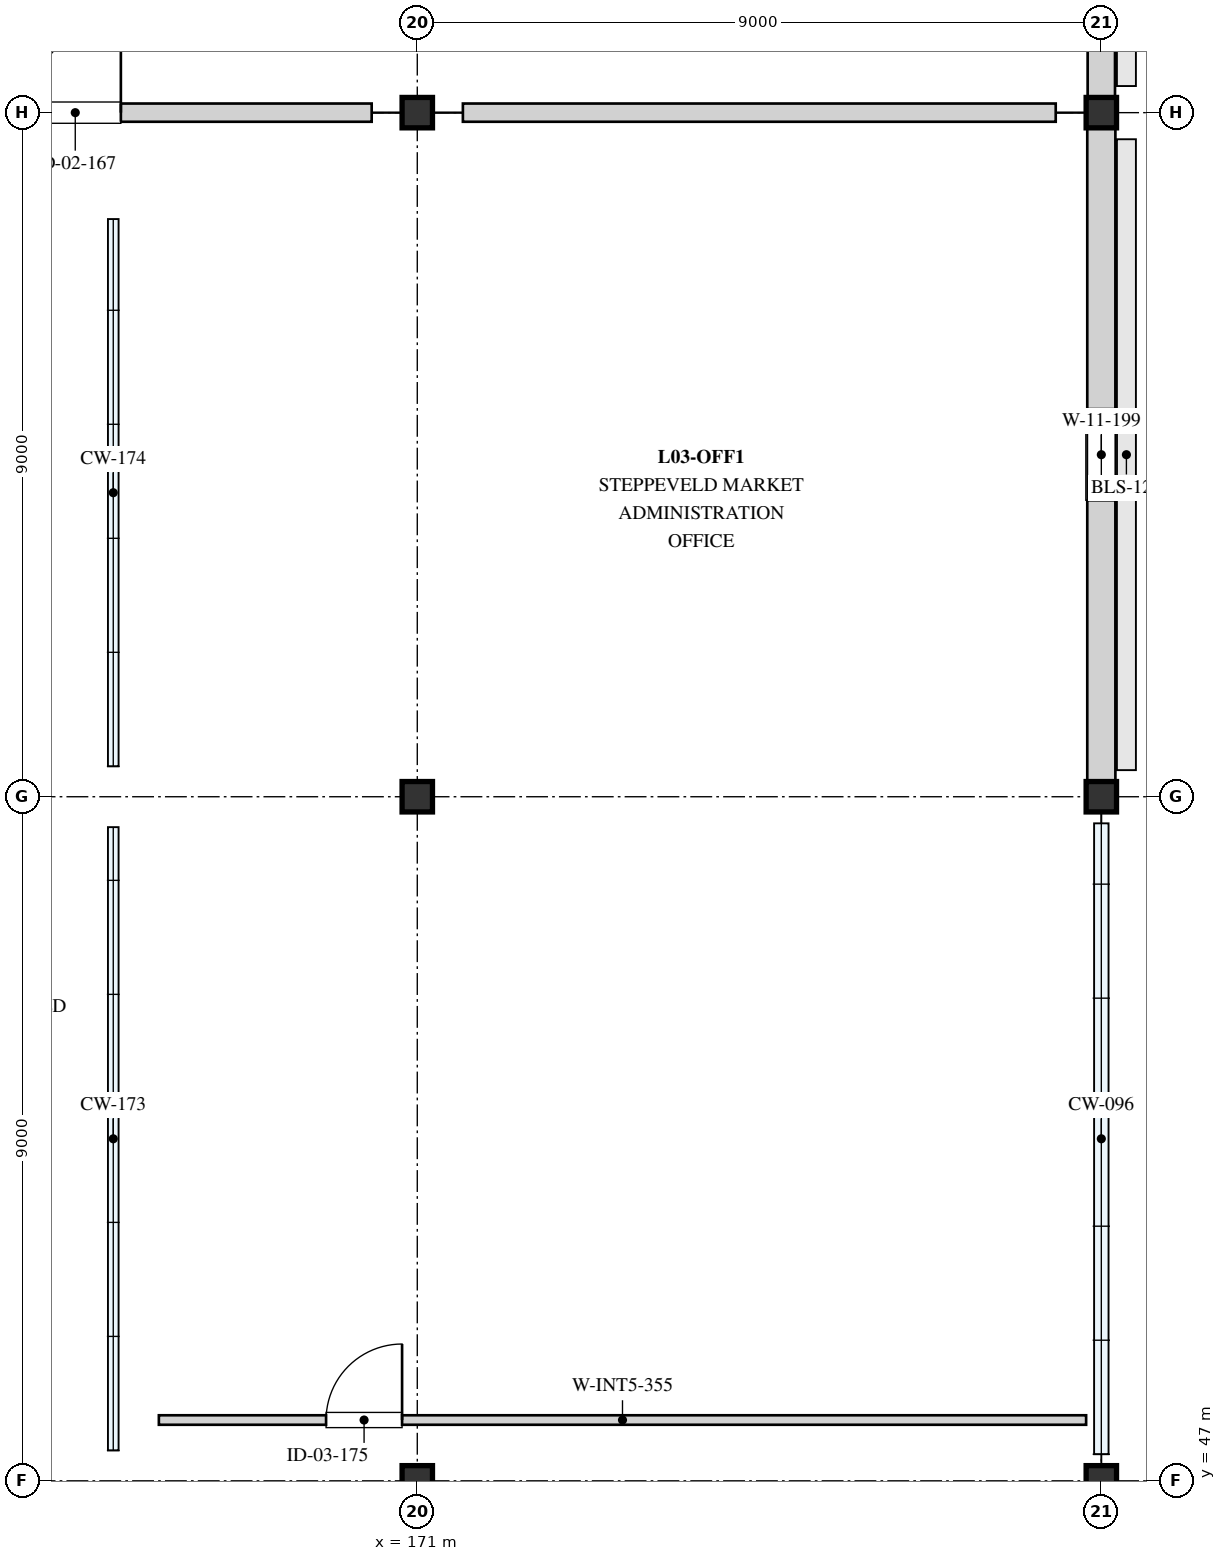
"""IFC4 building model, lengths in metres.
Left out: names, types, materials, properties, quantities, classifications, styles, units other than length and angle.
Written with IfcOpenShell. Run it as: python <this file> out.ifc"""

import sys

from ifc_helpers import new_model, si_unit, direction, frame, frame_2d, origin, origin_2d, place, context, subcontext, project, spatial, rectangle, extrude, element, fill, save


model = new_model("IFC4")
c1 = context("Model", 3, precision=1e-05, world=origin(), true_north=direction((0.0, 1.0)))
c2 = subcontext(c1, "Body", "Model", "MODEL_VIEW")
j1 = project(units=[si_unit("LENGTHUNIT", "METRE"), si_unit("PLANEANGLEUNIT", "RADIAN")], contexts=[c1])
p1 = place(None, origin())
s1 = spatial("IfcSite", under=j1, at=p1, CompositionType="ELEMENT")
p2 = place(p1, origin())
s2 = spatial("IfcBuilding", under=s1, at=p2, CompositionType="ELEMENT")
p3 = place(p2, frame((0.0, 0.0, 12.0)))
s3 = spatial("IfcBuildingStorey", under=s2, at=p3, CompositionType="ELEMENT", Elevation=12.0)
for number, where, z_axis, x_axis in (
    (1, (171.0, 47.0, 0.0), (0.0, 0.0, 1.0), (1.0, 0.0, 0.0)),
    (2, (171.0, 56.0, 0.0), (0.0, 0.0, 1.0), (1.0, 0.0, 0.0)),
    (3, (171.0, 65.0, 0.0), (0.0, 0.0, 1.0), (1.0, 0.0, 0.0)),
):
    element("IfcColumn", number, at=place(p3, frame(where, z_axis=z_axis, x_axis=x_axis)), inside=s3, PredefinedType="COLUMN", context=c2, shape_type="SweptSolid", body=[
        extrude(rectangle(XDim=0.4, YDim=0.4, at=origin_2d()), origin(), (0.0, 0.0, 1.0), 5.08),
    ])
for number, where, z_axis, x_axis in (
    (4, (180.0, 47.0, 0.0), (0.0, 0.0, 1.0), (1.0, 0.0, 0.0)),
    (5, (180.0, 56.0, 0.0), (0.0, 0.0, 1.0), (1.0, 0.0, 0.0)),
    (6, (180.0, 65.0, 0.0), (0.0, 0.0, 1.0), (1.0, 0.0, 0.0)),
):
    element("IfcColumn", number, at=place(p3, frame(where, z_axis=z_axis, x_axis=x_axis)), inside=s3, PredefinedType="COLUMN", context=c2, shape_type="SweptSolid", body=[
        extrude(rectangle(XDim=0.4, YDim=0.4, at=origin_2d()), origin(), (0.0, 0.0, 1.0), 3.08),
    ])
p4 = place(p3, frame((180.0, 65.0, 0.0), z_axis=(0.0, 0.0, 1.0), x_axis=(0.0, 1.0, 0.0)))
e7 = element("IfcWall", 7, at=p4, inside=s3, PredefinedType="STANDARD", context=c2, shape_type="SweptSolid", body=[
    extrude(rectangle(XDim=9.0, YDim=0.36, at=frame_2d((4.5, 0.0))), origin(), (0.0, 0.0, 1.0), 3.25),
])
p5 = place(p4, frame((3.45, 0.0, 0.8)))
e8 = element("IfcOpeningElement", 8, at=p5, cuts=e7, PredefinedType="OPENING", context=c2, shape_type="SweptSolid", body=[
    extrude(rectangle(XDim=2.1, YDim=2.2, at=frame_2d((1.05, 1.1))), frame((0.0, 0.19, 0.0), z_axis=(0.0, -1.0, 0.0), x_axis=(1.0, 0.0, 0.0)), (0.0, 0.0, 1.0), 0.38),
])
p6 = place(p3, frame((180.0, 56.0, 0.0), z_axis=(0.0, 0.0, 1.0), x_axis=(0.0, 1.0, 0.0)))
e9 = element("IfcWall", 9, at=p6, inside=s3, PredefinedType="STANDARD", context=c2, shape_type="SweptSolid", body=[
    extrude(rectangle(XDim=9.0, YDim=0.37, at=frame_2d((4.5, 0.0))), origin(), (0.0, 0.0, 1.0), 3.28),
])
p7 = place(p6, frame((3.9, 0.0, 0.9)))
e10 = element("IfcOpeningElement", 10, at=p7, cuts=e9, PredefinedType="OPENING", context=c2, shape_type="SweptSolid", body=[
    extrude(rectangle(XDim=1.2, YDim=1.8, at=frame_2d((0.6, 0.9))), frame((0.0, 0.195, 0.0), z_axis=(0.0, -1.0, 0.0), x_axis=(1.0, 0.0, 0.0)), (0.0, 0.0, 1.0), 0.39),
])
p8 = place(p3, frame((162.6, 65.0, 0.0), z_axis=(0.0, 0.0, 1.0), x_axis=(1.0, 0.0, 0.0)))
e11 = element("IfcWall", 11, at=p8, inside=s3, PredefinedType="SOLIDWALL", context=c2, shape_type="SweptSolid", body=[
    extrude(rectangle(XDim=7.8, YDim=0.24, at=frame_2d((3.9, 0.0))), origin(), (0.0, 0.0, 1.0), 2.35),
])
p9 = place(p8, frame((3.3, 0.0, 0.0)))
e12 = element("IfcOpeningElement", 12, at=p9, cuts=e11, PredefinedType="OPENING", context=c2, shape_type="SweptSolid", body=[
    extrude(rectangle(XDim=1.2, YDim=2.15, at=frame_2d((0.6, 1.075))), frame((0.0, 0.13, 0.0), z_axis=(0.0, -1.0, 0.0), x_axis=(1.0, 0.0, 0.0)), (0.0, 0.0, 1.0), 0.26),
])
p10 = place(p3, frame((171.6, 65.0, 0.0), z_axis=(0.0, 0.0, 1.0), x_axis=(1.0, 0.0, 0.0)))
e13 = element("IfcWall", 13, at=p10, inside=s3, PredefinedType="SOLIDWALL", context=c2, shape_type="SweptSolid", body=[
    extrude(rectangle(XDim=7.8, YDim=0.24, at=frame_2d((3.9, 0.0))), origin(), (0.0, 0.0, 1.0), 2.35),
])
p11 = place(p3, frame((167.6, 47.8, 0.0), z_axis=(0.0, 0.0, 1.0), x_axis=(1.0, 0.0, 0.0)))
e14 = element("IfcWall", 14, at=p11, inside=s3, PredefinedType="PARTITIONING", context=c2, shape_type="SweptSolid", body=[
    extrude(rectangle(XDim=12.2, YDim=0.125, at=frame_2d((6.1, 0.0))), origin(), (0.0, 0.0, 1.0), 2.35),
])
p12 = place(p11, frame((2.2, 0.0, 0.0)))
e15 = element("IfcOpeningElement", 15, at=p12, cuts=e14, PredefinedType="OPENING", context=c2, shape_type="SweptSolid", body=[
    extrude(rectangle(XDim=1.0, YDim=2.1, at=frame_2d((0.5, 1.05))), frame((0.0, 0.073, 0.0), z_axis=(0.0, -1.0, 0.0), x_axis=(1.0, 0.0, 0.0)), (0.0, 0.0, 1.0), 0.145),
])
p13 = place(p7, origin())
e16 = element("IfcWindow", 16, at=p13, inside=s3, PartitioningType="SINGLE_PANEL", PredefinedType="WINDOW", context=c2, shape_type="SweptSolid", body=[
    extrude(rectangle(XDim=1.2, YDim=1.8, at=frame_2d((0.6, 0.9))), frame((0.0, 0.03, 0.0), z_axis=(0.0, -1.0, 0.0), x_axis=(1.0, 0.0, 0.0)), (0.0, 0.0, 1.0), 0.06),
])
fill(e10, e16)
p14 = place(p9, origin())
e17 = element("IfcDoor", 17, at=p14, inside=s3, OperationType="SINGLE_SWING_RIGHT", PredefinedType="DOOR", context=c2, shape_type="SweptSolid", body=[
    extrude(rectangle(XDim=1.2, YDim=2.15, at=frame_2d((0.6, 1.075))), frame((0.0, 0.025, 0.0), z_axis=(0.0, -1.0, 0.0), x_axis=(1.0, 0.0, 0.0)), (0.0, 0.0, 1.0), 0.05),
])
fill(e12, e17)
p15 = place(p12, origin())
e18 = element("IfcDoor", 18, at=p15, inside=s3, OperationType="SINGLE_SWING_RIGHT", PredefinedType="DOOR", context=c2, shape_type="SweptSolid", body=[
    extrude(rectangle(XDim=1.0, YDim=2.1, at=frame_2d((0.5, 1.05))), frame((0.0, 0.025, 0.0), z_axis=(0.0, -1.0, 0.0), x_axis=(1.0, 0.0, 0.0)), (0.0, 0.0, 1.0), 0.05),
])
fill(e15, e18)
save(model, sys.argv[1])
